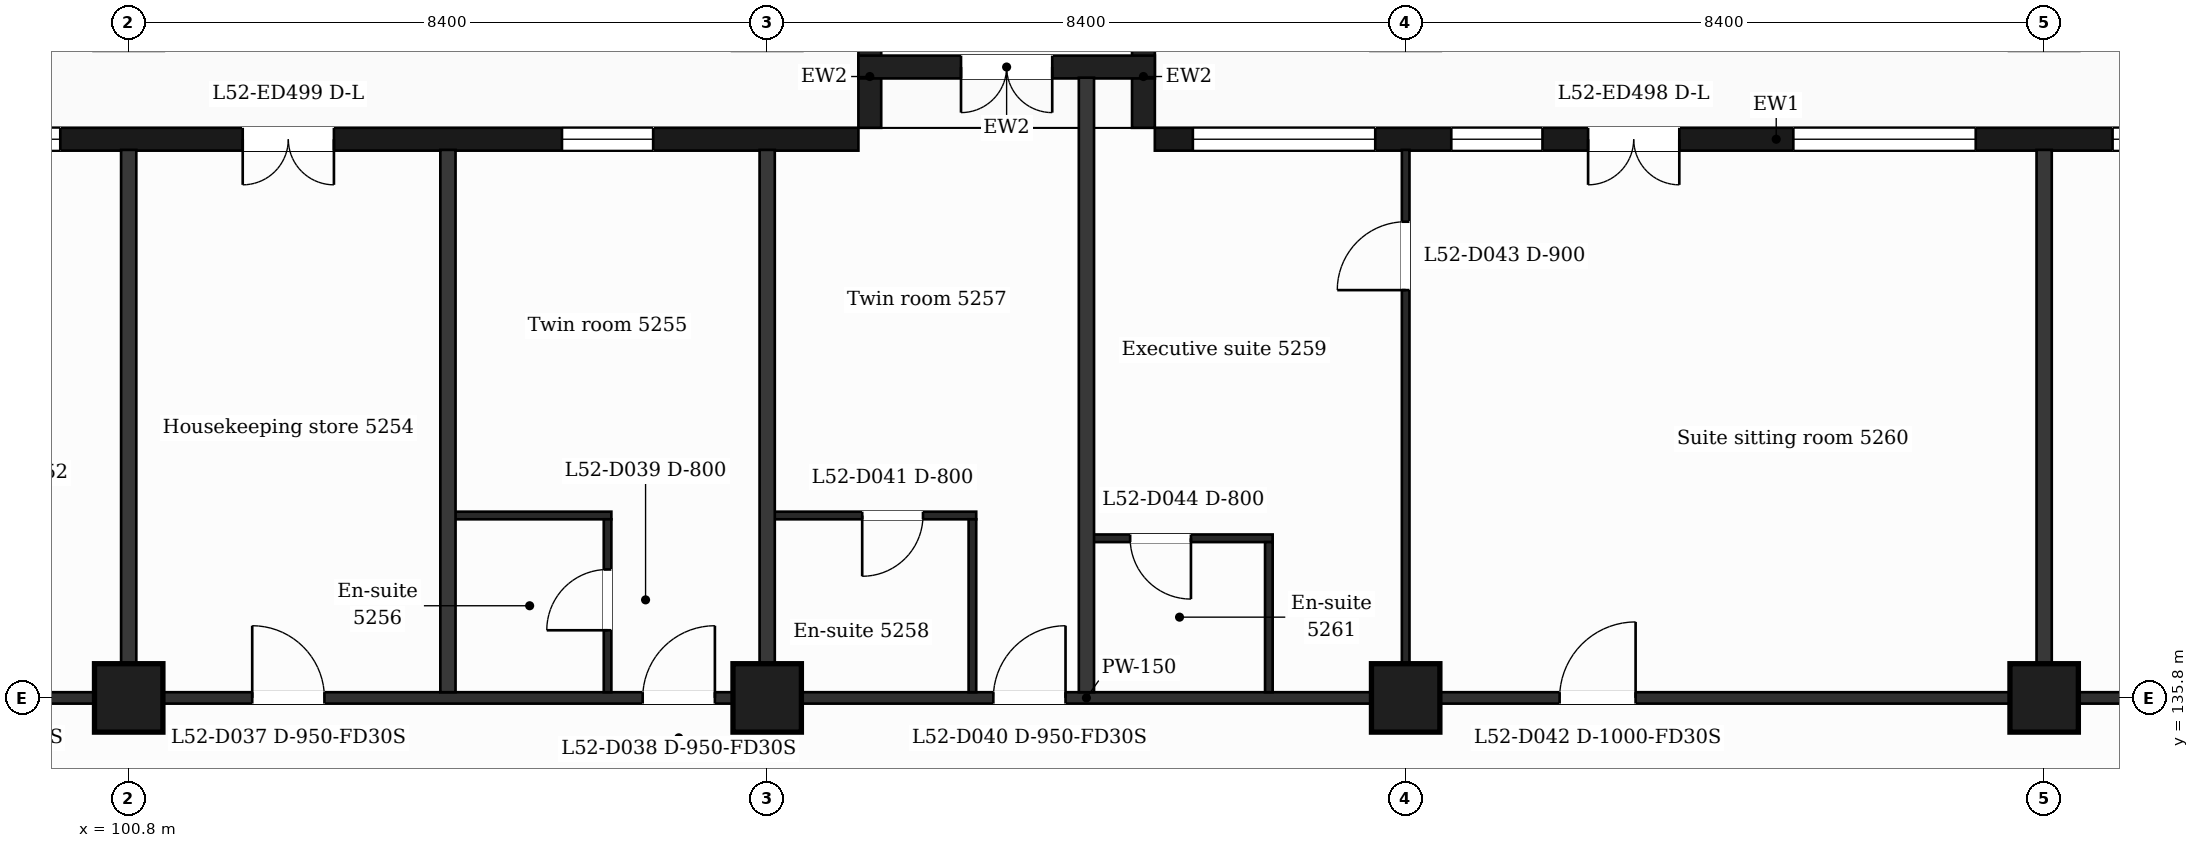
"""IFC4 building model, lengths in metres.
Left out: names, types, materials, properties, quantities, classifications, styles, units other than length and angle.
Written with IfcOpenShell. Run it as: python <this file> out.ifc"""

import sys

from ifc_helpers import new_model, si_unit, direction, frame, frame_2d, origin, origin_2d, place, context, subcontext, project, spatial, rectangle, extrude, element, fill, save


model = new_model("IFC4")
c1 = context("Model", 3, precision=1e-05, world=origin(), true_north=direction((0.0, 1.0)))
c2 = subcontext(c1, "Body", "Model", "MODEL_VIEW")
j1 = project(units=[si_unit("LENGTHUNIT", "METRE"), si_unit("PLANEANGLEUNIT", "RADIAN")], contexts=[c1])
p1 = place(None, origin())
s1 = spatial("IfcSite", under=j1, at=p1, CompositionType="ELEMENT")
p2 = place(p1, origin())
s2 = spatial("IfcBuilding", under=s1, at=p2, CompositionType="ELEMENT")
p3 = place(p2, frame((0.0, 0.0, 217.0)))
s3 = spatial("IfcBuildingStorey", under=s2, at=p3, CompositionType="ELEMENT", Elevation=217.0)
for number, where, z_axis, x_axis in (
    (1, (100.8, 135.8, 0.0), (0.0, 0.0, 1.0), (1.0, 0.0, 0.0)),
    (2, (109.2, 135.8, 0.0), (0.0, 0.0, 1.0), (1.0, 0.0, 0.0)),
    (3, (117.6, 135.8, 0.0), (0.0, 0.0, 1.0), (1.0, 0.0, 0.0)),
    (4, (126.0, 135.8, 0.0), (0.0, 0.0, 1.0), (1.0, 0.0, 0.0)),
):
    element("IfcColumn", number, at=place(p3, frame(where, z_axis=z_axis, x_axis=x_axis)), inside=s3, PredefinedType="COLUMN", context=c2, shape_type="SweptSolid", body=[
        extrude(rectangle(XDim=0.9, YDim=0.9, at=origin_2d()), origin(), (0.0, 0.0, 1.0), 3.7),
    ])
p4 = place(p3, frame((130.65, 143.15, 0.0), z_axis=(0.0, 0.0, 1.0), x_axis=(-1.0, 0.0, 0.0)))
e5 = element("IfcWall", 5, at=p4, inside=s3, PredefinedType="SOLIDWALL", context=c2, shape_type="SweptSolid", body=[
    extrude(rectangle(XDim=16.35, YDim=0.3, at=frame_2d((8.175, 0.0))), origin(), (0.0, 0.0, 1.0), 3.38),
])
p5 = place(p4, frame((1.35, 0.0, 0.9)))
e6 = element("IfcOpeningElement", 6, at=p5, cuts=e5, PredefinedType="OPENING", context=c2, shape_type="SweptSolid", body=[
    extrude(rectangle(XDim=2.4, YDim=2.1, at=frame_2d((1.2, 1.05))), frame((0.0, 0.16, 0.0), z_axis=(0.0, -1.0, 0.0), x_axis=(1.0, 0.0, 0.0)), (0.0, 0.0, 1.0), 0.32),
])
p6 = place(p4, frame((5.55, 0.0, 0.9)))
e7 = element("IfcOpeningElement", 7, at=p6, cuts=e5, PredefinedType="OPENING", context=c2, shape_type="SweptSolid", body=[
    extrude(rectangle(XDim=2.4, YDim=2.1, at=frame_2d((1.2, 1.05))), frame((0.0, 0.16, 0.0), z_axis=(0.0, -1.0, 0.0), x_axis=(1.0, 0.0, 0.0)), (0.0, 0.0, 1.0), 0.32),
])
p7 = place(p4, frame((9.45, 0.0, 0.0)))
e8 = element("IfcOpeningElement", 8, at=p7, cuts=e5, PredefinedType="OPENING", context=c2, shape_type="SweptSolid", body=[
    extrude(rectangle(XDim=1.2, YDim=2.4, at=frame_2d((0.6, 1.2))), frame((0.0, 0.16, 0.0), z_axis=(0.0, -1.0, 0.0), x_axis=(1.0, 0.0, 0.0)), (0.0, 0.0, 1.0), 0.32),
])
p8 = place(p4, frame((11.25, 0.0, 0.9)))
e9 = element("IfcOpeningElement", 9, at=p8, cuts=e5, PredefinedType="OPENING", context=c2, shape_type="SweptSolid", body=[
    extrude(rectangle(XDim=1.2, YDim=2.1, at=frame_2d((0.6, 1.05))), frame((0.0, 0.16, 0.0), z_axis=(0.0, -1.0, 0.0), x_axis=(1.0, 0.0, 0.0)), (0.0, 0.0, 1.0), 0.32),
])
p9 = place(p4, frame((13.45, 0.0, 0.9)))
e10 = element("IfcOpeningElement", 10, at=p9, cuts=e5, PredefinedType="OPENING", context=c2, shape_type="SweptSolid", body=[
    extrude(rectangle(XDim=2.4, YDim=2.1, at=frame_2d((1.2, 1.05))), frame((0.0, 0.16, 0.0), z_axis=(0.0, -1.0, 0.0), x_axis=(1.0, 0.0, 0.0)), (0.0, 0.0, 1.0), 0.32),
])
p10 = place(p3, frame((110.4, 143.15, 0.0), z_axis=(0.0, 0.0, 1.0), x_axis=(-1.0, 0.0, 0.0)))
e11 = element("IfcWall", 11, at=p10, inside=s3, PredefinedType="SOLIDWALL", context=c2, shape_type="SweptSolid", body=[
    extrude(rectangle(XDim=14.4, YDim=0.3, at=frame_2d((7.2, 0.0))), origin(), (0.0, 0.0, 1.0), 3.38),
])
p11 = place(p10, frame((2.7, 0.0, 0.9)))
e12 = element("IfcOpeningElement", 12, at=p11, cuts=e11, PredefinedType="OPENING", context=c2, shape_type="SweptSolid", body=[
    extrude(rectangle(XDim=1.2, YDim=2.1, at=frame_2d((0.6, 1.05))), frame((0.0, 0.16, 0.0), z_axis=(0.0, -1.0, 0.0), x_axis=(1.0, 0.0, 0.0)), (0.0, 0.0, 1.0), 0.32),
])
p12 = place(p10, frame((6.9, 0.0, 0.0)))
e13 = element("IfcOpeningElement", 13, at=p12, cuts=e11, PredefinedType="OPENING", context=c2, shape_type="SweptSolid", body=[
    extrude(rectangle(XDim=1.2, YDim=2.4, at=frame_2d((0.6, 1.2))), frame((0.0, 0.16, 0.0), z_axis=(0.0, -1.0, 0.0), x_axis=(1.0, 0.0, 0.0)), (0.0, 0.0, 1.0), 0.32),
])
p13 = place(p10, frame((10.5, 0.0, 0.9)))
e14 = element("IfcOpeningElement", 14, at=p13, cuts=e11, PredefinedType="OPENING", context=c2, shape_type="SweptSolid", body=[
    extrude(rectangle(XDim=2.4, YDim=2.1, at=frame_2d((1.2, 1.05))), frame((0.0, 0.16, 0.0), z_axis=(0.0, -1.0, 0.0), x_axis=(1.0, 0.0, 0.0)), (0.0, 0.0, 1.0), 0.32),
])
for number, where, z_axis, x_axis in (
    (15, (114.15, 143.3, 0.0), (0.0, 0.0, 1.0), (0.0, 1.0, 0.0)),
    (16, (110.55, 143.3, 0.0), (0.0, 0.0, 1.0), (0.0, 1.0, 0.0)),
):
    element("IfcWall", number, at=place(p3, frame(where, z_axis=z_axis, x_axis=x_axis)), inside=s3, PredefinedType="SOLIDWALL", context=c2, shape_type="SweptSolid", body=[
        extrude(rectangle(XDim=1.35, YDim=0.3, at=frame_2d((0.675, 0.0))), origin(), (0.0, 0.0, 1.0), 3.38),
    ])
p14 = place(p3, frame((114.3, 144.1, 0.0), z_axis=(0.0, 0.0, 1.0), x_axis=(-1.0, 0.0, 0.0)))
e17 = element("IfcWall", 17, at=p14, inside=s3, PredefinedType="SOLIDWALL", context=c2, shape_type="SweptSolid", body=[
    extrude(rectangle(XDim=3.9, YDim=0.3, at=frame_2d((1.95, 0.0))), origin(), (0.0, 0.0, 1.0), 3.38),
])
p15 = place(p14, frame((1.35, 0.0, 0.0)))
e18 = element("IfcOpeningElement", 18, at=p15, cuts=e17, PredefinedType="OPENING", context=c2, shape_type="SweptSolid", body=[
    extrude(rectangle(XDim=1.2, YDim=2.4, at=frame_2d((0.6, 1.2))), frame((0.0, 0.16, 0.0), z_axis=(0.0, -1.0, 0.0), x_axis=(1.0, 0.0, 0.0)), (0.0, 0.0, 1.0), 0.32),
])
p16 = place(p3, frame((90.895, 135.8, 0.0), z_axis=(0.0, 0.0, 1.0), x_axis=(1.0, 0.0, 0.0)))
e19 = element("IfcWall", 19, at=p16, inside=s3, PredefinedType="PARTITIONING", context=c2, shape_type="SweptSolid", body=[
    extrude(rectangle(XDim=45.011, YDim=0.15, at=frame_2d((22.505, 0.0))), origin(), (0.0, 0.0, 1.0), 3.38),
])
p17 = place(p16, frame((6.906, 0.0, 0.0)))
e20 = element("IfcOpeningElement", 20, at=p17, cuts=e19, PredefinedType="OPENING", context=c2, shape_type="SweptSolid", body=[
    extrude(rectangle(XDim=1.0, YDim=2.1, at=frame_2d((0.5, 1.05))), frame((0.0, 0.085, 0.0), z_axis=(0.0, -1.0, 0.0), x_axis=(1.0, 0.0, 0.0)), (0.0, 0.0, 1.0), 0.17),
])
p18 = place(p16, frame((11.531, 0.0, 0.0)))
e21 = element("IfcOpeningElement", 21, at=p18, cuts=e19, PredefinedType="OPENING", context=c2, shape_type="SweptSolid", body=[
    extrude(rectangle(XDim=0.95, YDim=2.1, at=frame_2d((0.475, 1.05))), frame((0.0, 0.085, 0.0), z_axis=(0.0, -1.0, 0.0), x_axis=(1.0, 0.0, 0.0)), (0.0, 0.0, 1.0), 0.17),
])
p19 = place(p16, frame((16.667, 0.0, 0.0)))
e22 = element("IfcOpeningElement", 22, at=p19, cuts=e19, PredefinedType="OPENING", context=c2, shape_type="SweptSolid", body=[
    extrude(rectangle(XDim=0.95, YDim=2.1, at=frame_2d((0.475, 1.05))), frame((0.0, 0.085, 0.0), z_axis=(0.0, -1.0, 0.0), x_axis=(1.0, 0.0, 0.0)), (0.0, 0.0, 1.0), 0.17),
])
p20 = place(p16, frame((21.281, 0.0, 0.0)))
e23 = element("IfcOpeningElement", 23, at=p20, cuts=e19, PredefinedType="OPENING", context=c2, shape_type="SweptSolid", body=[
    extrude(rectangle(XDim=0.95, YDim=2.1, at=frame_2d((0.475, 1.05))), frame((0.0, 0.085, 0.0), z_axis=(0.0, -1.0, 0.0), x_axis=(1.0, 0.0, 0.0)), (0.0, 0.0, 1.0), 0.17),
])
p21 = place(p16, frame((28.73, 0.0, 0.0)))
e24 = element("IfcOpeningElement", 24, at=p21, cuts=e19, PredefinedType="OPENING", context=c2, shape_type="SweptSolid", body=[
    extrude(rectangle(XDim=1.0, YDim=2.1, at=frame_2d((0.5, 1.05))), frame((0.0, 0.085, 0.0), z_axis=(0.0, -1.0, 0.0), x_axis=(1.0, 0.0, 0.0)), (0.0, 0.0, 1.0), 0.17),
])
p22 = place(p16, frame((39.814, 0.0, 0.0)))
e25 = element("IfcOpeningElement", 25, at=p22, cuts=e19, PredefinedType="OPENING", context=c2, shape_type="SweptSolid", body=[
    extrude(rectangle(XDim=0.95, YDim=2.1, at=frame_2d((0.475, 1.05))), frame((0.0, 0.085, 0.0), z_axis=(0.0, -1.0, 0.0), x_axis=(1.0, 0.0, 0.0)), (0.0, 0.0, 1.0), 0.17),
])
p23 = place(p3, frame((113.4, 137.9, 0.0), z_axis=(0.0, 0.0, 1.0), x_axis=(1.0, 0.0, 0.0)))
e26 = element("IfcWall", 26, at=p23, inside=s3, PredefinedType="PARTITIONING", context=c2, shape_type="SweptSolid", body=[
    extrude(rectangle(XDim=2.45, YDim=0.1, at=frame_2d((1.225, 0.0))), origin(), (0.0, 0.0, 1.0), 3.38),
])
p24 = place(p23, frame((0.575, 0.0, 0.0)))
e27 = element("IfcOpeningElement", 27, at=p24, cuts=e26, PredefinedType="OPENING", context=c2, shape_type="SweptSolid", body=[
    extrude(rectangle(XDim=0.8, YDim=2.1, at=frame_2d((0.4, 1.05))), frame((0.0, 0.06, 0.0), z_axis=(0.0, -1.0, 0.0), x_axis=(1.0, 0.0, 0.0)), (0.0, 0.0, 1.0), 0.12),
])
p25 = place(p3, frame((105.0, 138.2, 0.0), z_axis=(0.0, 0.0, 1.0), x_axis=(1.0, 0.0, 0.0)))
e28 = element("IfcWall", 28, at=p25, inside=s3, PredefinedType="PARTITIONING", context=c2, shape_type="SweptSolid", body=[
    extrude(rectangle(XDim=2.15, YDim=0.1, at=frame_2d((1.075, 0.0))), origin(), (0.0, 0.0, 1.0), 3.38),
])
p26 = place(p3, frame((109.2, 138.2, 0.0), z_axis=(0.0, 0.0, 1.0), x_axis=(1.0, 0.0, 0.0)))
e29 = element("IfcWall", 29, at=p26, inside=s3, PredefinedType="PARTITIONING", context=c2, shape_type="SweptSolid", body=[
    extrude(rectangle(XDim=2.75, YDim=0.1, at=frame_2d((1.375, 0.0))), origin(), (0.0, 0.0, 1.0), 3.38),
])
p27 = place(p26, frame((1.25, 0.0, 0.0)))
e30 = element("IfcOpeningElement", 30, at=p27, cuts=e29, PredefinedType="OPENING", context=c2, shape_type="SweptSolid", body=[
    extrude(rectangle(XDim=0.8, YDim=2.1, at=frame_2d((0.4, 1.05))), frame((0.0, 0.06, 0.0), z_axis=(0.0, -1.0, 0.0), x_axis=(1.0, 0.0, 0.0)), (0.0, 0.0, 1.0), 0.12),
])
for number, where, z_axis, x_axis in (
    (31, (100.8, 135.875, 0.0), (0.0, 0.0, 1.0), (0.0, 1.0, 0.0)),
    (32, (105.0, 135.875, 0.0), (0.0, 0.0, 1.0), (0.0, 1.0, 0.0)),
):
    element("IfcWall", number, at=place(p3, frame(where, z_axis=z_axis, x_axis=x_axis)), inside=s3, PredefinedType="PARTITIONING", context=c2, shape_type="SweptSolid", body=[
        extrude(rectangle(XDim=7.135, YDim=0.2, at=frame_2d((3.567, 0.0))), origin(), (0.0, 0.0, 1.0), 3.38),
    ])
p28 = place(p3, frame((107.1, 135.875, 0.0), z_axis=(0.0, 0.0, 1.0), x_axis=(0.0, 1.0, 0.0)))
e33 = element("IfcWall", 33, at=p28, inside=s3, PredefinedType="PARTITIONING", context=c2, shape_type="SweptSolid", body=[
    extrude(rectangle(XDim=2.275, YDim=0.1, at=frame_2d((1.137, 0.0))), origin(), (0.0, 0.0, 1.0), 3.38),
])
p29 = place(p28, frame((0.815, 0.0, 0.0)))
e34 = element("IfcOpeningElement", 34, at=p29, cuts=e33, PredefinedType="OPENING", context=c2, shape_type="SweptSolid", body=[
    extrude(rectangle(XDim=0.8, YDim=2.1, at=frame_2d((0.4, 1.05))), frame((0.0, 0.06, 0.0), z_axis=(0.0, -1.0, 0.0), x_axis=(1.0, 0.0, 0.0)), (0.0, 0.0, 1.0), 0.12),
])
p30 = place(p3, frame((109.2, 135.875, 0.0), z_axis=(0.0, 0.0, 1.0), x_axis=(0.0, 1.0, 0.0)))
e35 = element("IfcWall", 35, at=p30, inside=s3, PredefinedType="PARTITIONING", context=c2, shape_type="SweptSolid", body=[
    extrude(rectangle(XDim=7.135, YDim=0.2, at=frame_2d((3.567, 0.0))), origin(), (0.0, 0.0, 1.0), 3.38),
])
p31 = place(p3, frame((111.9, 135.875, 0.0), z_axis=(0.0, 0.0, 1.0), x_axis=(0.0, 1.0, 0.0)))
e36 = element("IfcWall", 36, at=p31, inside=s3, PredefinedType="PARTITIONING", context=c2, shape_type="SweptSolid", body=[
    extrude(rectangle(XDim=2.275, YDim=0.1, at=frame_2d((1.137, 0.0))), origin(), (0.0, 0.0, 1.0), 3.38),
])
p32 = place(p3, frame((113.4, 135.875, 0.0), z_axis=(0.0, 0.0, 1.0), x_axis=(0.0, 1.0, 0.0)))
e37 = element("IfcWall", 37, at=p32, inside=s3, PredefinedType="PARTITIONING", context=c2, shape_type="SweptSolid", body=[
    extrude(rectangle(XDim=8.085, YDim=0.2, at=frame_2d((4.042, 0.0))), origin(), (0.0, 0.0, 1.0), 3.38),
])
p33 = place(p3, frame((115.8, 135.875, 0.0), z_axis=(0.0, 0.0, 1.0), x_axis=(0.0, 1.0, 0.0)))
e38 = element("IfcWall", 38, at=p33, inside=s3, PredefinedType="PARTITIONING", context=c2, shape_type="SweptSolid", body=[
    extrude(rectangle(XDim=1.975, YDim=0.1, at=frame_2d((0.988, 0.0))), origin(), (0.0, 0.0, 1.0), 3.38),
])
p34 = place(p3, frame((117.6, 135.875, 0.0), z_axis=(0.0, 0.0, 1.0), x_axis=(0.0, 1.0, 0.0)))
e39 = element("IfcWall", 39, at=p34, inside=s3, PredefinedType="PARTITIONING", context=c2, shape_type="SweptSolid", body=[
    extrude(rectangle(XDim=7.135, YDim=0.1, at=frame_2d((3.567, 0.0))), origin(), (0.0, 0.0, 1.0), 3.38),
])
p35 = place(p34, frame((5.29, 0.0, 0.0)))
e40 = element("IfcOpeningElement", 40, at=p35, cuts=e39, PredefinedType="OPENING", context=c2, shape_type="SweptSolid", body=[
    extrude(rectangle(XDim=0.9, YDim=2.1, at=frame_2d((0.45, 1.05))), frame((0.0, 0.06, 0.0), z_axis=(0.0, -1.0, 0.0), x_axis=(1.0, 0.0, 0.0)), (0.0, 0.0, 1.0), 0.12),
])
p36 = place(p3, frame((126.0, 135.875, 0.0), z_axis=(0.0, 0.0, 1.0), x_axis=(0.0, 1.0, 0.0)))
e41 = element("IfcWall", 41, at=p36, inside=s3, PredefinedType="PARTITIONING", context=c2, shape_type="SweptSolid", body=[
    extrude(rectangle(XDim=7.135, YDim=0.2, at=frame_2d((3.567, 0.0))), origin(), (0.0, 0.0, 1.0), 3.38),
])
p37 = place(p5, origin())
e42 = element("IfcWindow", 42, at=p37, inside=s3, PartitioningType="SINGLE_PANEL", PredefinedType="WINDOW", context=c2, shape_type="SweptSolid", body=[
    extrude(rectangle(XDim=2.4, YDim=2.1, at=frame_2d((1.2, 1.05))), frame((0.0, 0.03, 0.0), z_axis=(0.0, -1.0, 0.0), x_axis=(1.0, 0.0, 0.0)), (0.0, 0.0, 1.0), 0.06),
])
fill(e6, e42)
p38 = place(p6, origin())
e43 = element("IfcWindow", 43, at=p38, inside=s3, PartitioningType="SINGLE_PANEL", PredefinedType="WINDOW", context=c2, shape_type="SweptSolid", body=[
    extrude(rectangle(XDim=2.4, YDim=2.1, at=frame_2d((1.2, 1.05))), frame((0.0, 0.03, 0.0), z_axis=(0.0, -1.0, 0.0), x_axis=(1.0, 0.0, 0.0)), (0.0, 0.0, 1.0), 0.06),
])
fill(e7, e43)
p39 = place(p7, origin())
e44 = element("IfcDoor", 44, at=p39, inside=s3, OperationType="DOUBLE_DOOR_SINGLE_SWING", PredefinedType="DOOR", context=c2, shape_type="SweptSolid", body=[
    extrude(rectangle(XDim=1.2, YDim=2.4, at=frame_2d((0.6, 1.2))), frame((0.0, 0.025, 0.0), z_axis=(0.0, -1.0, 0.0), x_axis=(1.0, 0.0, 0.0)), (0.0, 0.0, 1.0), 0.05),
])
fill(e8, e44)
p40 = place(p8, origin())
e45 = element("IfcWindow", 45, at=p40, inside=s3, PartitioningType="SINGLE_PANEL", PredefinedType="WINDOW", context=c2, shape_type="SweptSolid", body=[
    extrude(rectangle(XDim=1.2, YDim=2.1, at=frame_2d((0.6, 1.05))), frame((0.0, 0.03, 0.0), z_axis=(0.0, -1.0, 0.0), x_axis=(1.0, 0.0, 0.0)), (0.0, 0.0, 1.0), 0.06),
])
fill(e9, e45)
p41 = place(p9, origin())
e46 = element("IfcWindow", 46, at=p41, inside=s3, PartitioningType="SINGLE_PANEL", PredefinedType="WINDOW", context=c2, shape_type="SweptSolid", body=[
    extrude(rectangle(XDim=2.4, YDim=2.1, at=frame_2d((1.2, 1.05))), frame((0.0, 0.03, 0.0), z_axis=(0.0, -1.0, 0.0), x_axis=(1.0, 0.0, 0.0)), (0.0, 0.0, 1.0), 0.06),
])
fill(e10, e46)
p42 = place(p11, origin())
e47 = element("IfcWindow", 47, at=p42, inside=s3, PartitioningType="SINGLE_PANEL", PredefinedType="WINDOW", context=c2, shape_type="SweptSolid", body=[
    extrude(rectangle(XDim=1.2, YDim=2.1, at=frame_2d((0.6, 1.05))), frame((0.0, 0.03, 0.0), z_axis=(0.0, -1.0, 0.0), x_axis=(1.0, 0.0, 0.0)), (0.0, 0.0, 1.0), 0.06),
])
fill(e12, e47)
p43 = place(p12, origin())
e48 = element("IfcDoor", 48, at=p43, inside=s3, OperationType="DOUBLE_DOOR_SINGLE_SWING", PredefinedType="DOOR", context=c2, shape_type="SweptSolid", body=[
    extrude(rectangle(XDim=1.2, YDim=2.4, at=frame_2d((0.6, 1.2))), frame((0.0, 0.025, 0.0), z_axis=(0.0, -1.0, 0.0), x_axis=(1.0, 0.0, 0.0)), (0.0, 0.0, 1.0), 0.05),
])
fill(e13, e48)
p44 = place(p13, origin())
e49 = element("IfcWindow", 49, at=p44, inside=s3, PartitioningType="SINGLE_PANEL", PredefinedType="WINDOW", context=c2, shape_type="SweptSolid", body=[
    extrude(rectangle(XDim=2.4, YDim=2.1, at=frame_2d((1.2, 1.05))), frame((0.0, 0.03, 0.0), z_axis=(0.0, -1.0, 0.0), x_axis=(1.0, 0.0, 0.0)), (0.0, 0.0, 1.0), 0.06),
])
fill(e14, e49)
p45 = place(p15, origin())
e50 = element("IfcDoor", 50, at=p45, inside=s3, OperationType="DOUBLE_DOOR_SINGLE_SWING", PredefinedType="DOOR", context=c2, shape_type="SweptSolid", body=[
    extrude(rectangle(XDim=1.2, YDim=2.4, at=frame_2d((0.6, 1.2))), frame((0.0, 0.025, 0.0), z_axis=(0.0, -1.0, 0.0), x_axis=(1.0, 0.0, 0.0)), (0.0, 0.0, 1.0), 0.05),
])
fill(e18, e50)
p46 = place(p18, origin())
e51 = element("IfcDoor", 51, at=p46, inside=s3, OperationType="SINGLE_SWING_LEFT", PredefinedType="DOOR", context=c2, shape_type="SweptSolid", body=[
    extrude(rectangle(XDim=0.95, YDim=2.1, at=frame_2d((0.475, 1.05))), frame((0.0, 0.025, 0.0), z_axis=(0.0, -1.0, 0.0), x_axis=(1.0, 0.0, 0.0)), (0.0, 0.0, 1.0), 0.05),
])
fill(e21, e51)
p47 = place(p19, origin())
e52 = element("IfcDoor", 52, at=p47, inside=s3, OperationType="SINGLE_SWING_RIGHT", PredefinedType="DOOR", context=c2, shape_type="SweptSolid", body=[
    extrude(rectangle(XDim=0.95, YDim=2.1, at=frame_2d((0.475, 1.05))), frame((0.0, 0.025, 0.0), z_axis=(0.0, -1.0, 0.0), x_axis=(1.0, 0.0, 0.0)), (0.0, 0.0, 1.0), 0.05),
])
fill(e22, e52)
p48 = place(p29, origin())
e53 = element("IfcDoor", 53, at=p48, inside=s3, OperationType="SINGLE_SWING_LEFT", PredefinedType="DOOR", context=c2, shape_type="SweptSolid", body=[
    extrude(rectangle(XDim=0.8, YDim=2.1, at=frame_2d((0.4, 1.05))), frame((0.0, 0.025, 0.0), z_axis=(0.0, -1.0, 0.0), x_axis=(1.0, 0.0, 0.0)), (0.0, 0.0, 1.0), 0.05),
])
fill(e34, e53)
p49 = place(p20, origin())
e54 = element("IfcDoor", 54, at=p49, inside=s3, OperationType="SINGLE_SWING_RIGHT", PredefinedType="DOOR", context=c2, shape_type="SweptSolid", body=[
    extrude(rectangle(XDim=0.95, YDim=2.1, at=frame_2d((0.475, 1.05))), frame((0.0, 0.025, 0.0), z_axis=(0.0, -1.0, 0.0), x_axis=(1.0, 0.0, 0.0)), (0.0, 0.0, 1.0), 0.05),
])
fill(e23, e54)
p50 = place(p27, origin())
e55 = element("IfcDoor", 55, at=p50, inside=s3, OperationType="SINGLE_SWING_LEFT", PredefinedType="DOOR", context=c2, shape_type="SweptSolid", body=[
    extrude(rectangle(XDim=0.8, YDim=2.1, at=frame_2d((0.4, 1.05))), frame((0.0, 0.025, 0.0), z_axis=(0.0, -1.0, 0.0), x_axis=(1.0, 0.0, 0.0)), (0.0, 0.0, 1.0), 0.05),
])
fill(e30, e55)
p51 = place(p21, origin())
e56 = element("IfcDoor", 56, at=p51, inside=s3, OperationType="SINGLE_SWING_RIGHT", PredefinedType="DOOR", context=c2, shape_type="SweptSolid", body=[
    extrude(rectangle(XDim=1.0, YDim=2.1, at=frame_2d((0.5, 1.05))), frame((0.0, 0.025, 0.0), z_axis=(0.0, -1.0, 0.0), x_axis=(1.0, 0.0, 0.0)), (0.0, 0.0, 1.0), 0.05),
])
fill(e24, e56)
p52 = place(p35, origin())
e57 = element("IfcDoor", 57, at=p52, inside=s3, OperationType="SINGLE_SWING_LEFT", PredefinedType="DOOR", context=c2, shape_type="SweptSolid", body=[
    extrude(rectangle(XDim=0.9, YDim=2.1, at=frame_2d((0.45, 1.05))), frame((0.0, 0.025, 0.0), z_axis=(0.0, -1.0, 0.0), x_axis=(1.0, 0.0, 0.0)), (0.0, 0.0, 1.0), 0.05),
])
fill(e40, e57)
p53 = place(p24, origin())
e58 = element("IfcDoor", 58, at=p53, inside=s3, OperationType="SINGLE_SWING_RIGHT", PredefinedType="DOOR", context=c2, shape_type="SweptSolid", body=[
    extrude(rectangle(XDim=0.8, YDim=2.1, at=frame_2d((0.4, 1.05))), frame((0.0, 0.025, 0.0), z_axis=(0.0, -1.0, 0.0), x_axis=(1.0, 0.0, 0.0)), (0.0, 0.0, 1.0), 0.05),
])
fill(e27, e58)
save(model, sys.argv[1])
